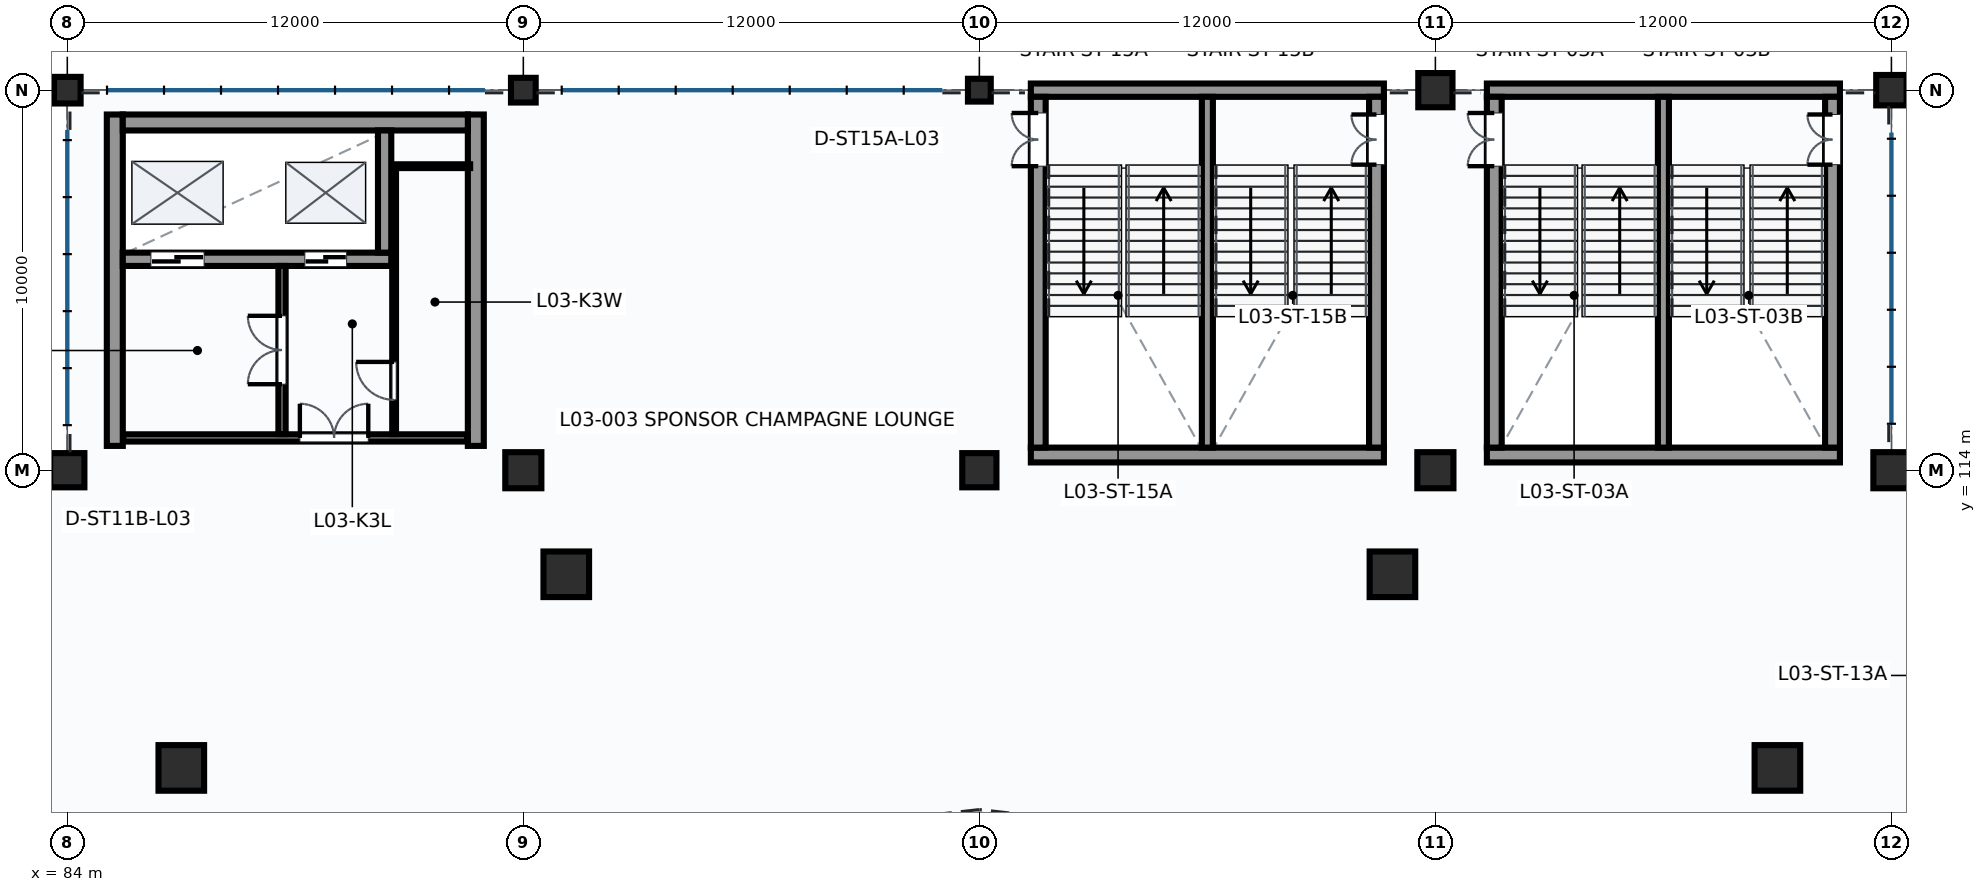
"""IFC4 building model, lengths in metres.
Left out: names, types, materials, properties, quantities, classifications, styles, units other than length and angle.
Written with IfcOpenShell. Run it as: python <this file> out.ifc"""

import sys

from ifc_helpers import new_model, si_unit, direction, frame, frame_2d, origin, origin_2d, place, context, subcontext, project, spatial, rectangle, circle, extrude, element, fill, save


model = new_model("IFC4")
c1 = context("Model", 3, precision=1e-05, world=origin(), true_north=direction((0.0, 1.0)))
c2 = subcontext(c1, "Body", "Model", "MODEL_VIEW")
j1 = project(units=[si_unit("LENGTHUNIT", "METRE"), si_unit("PLANEANGLEUNIT", "RADIAN")], contexts=[c1])
p1 = place(None, origin())
s1 = spatial("IfcSite", under=j1, at=p1, CompositionType="ELEMENT")
p2 = place(p1, origin())
s2 = spatial("IfcBuilding", under=s1, at=p2, CompositionType="ELEMENT")
p3 = place(p2, frame((0.0, 0.0, 14.7)))
s3 = spatial("IfcBuildingStorey", under=s2, at=p3, CompositionType="ELEMENT", Elevation=14.7)
p4 = place(p3, frame((84.0, 114.0, 0.0), z_axis=(0.0, 0.0, 1.0), x_axis=(1.0, 0.0, 0.0)))
e1 = element("IfcColumn", 1, at=p4, inside=s3, PredefinedType="COLUMN", context=c2, shape_type="SweptSolid", body=[
    extrude(circle(Radius=0.45, at=origin_2d()), origin(), (0.0, 0.0, 1.0), 4.5),
])
p5 = place(p3, frame((84.0, 124.0, 0.0), z_axis=(0.0, 0.0, 1.0), x_axis=(1.0, 0.0, 0.0)))
e2 = element("IfcColumn", 2, at=p5, inside=s3, PredefinedType="COLUMN", context=c2, shape_type="SweptSolid", body=[
    extrude(rectangle(XDim=0.7, YDim=0.7, at=origin_2d()), origin(), (0.0, 0.0, 1.0), 4.5),
])
p6 = place(p3, frame((96.0, 114.0, 0.0), z_axis=(0.0, 0.0, 1.0), x_axis=(1.0, 0.0, 0.0)))
e3 = element("IfcColumn", 3, at=p6, inside=s3, PredefinedType="COLUMN", context=c2, shape_type="SweptSolid", body=[
    extrude(rectangle(XDim=0.95, YDim=0.95, at=origin_2d()), origin(), (0.0, 0.0, 1.0), 4.5),
])
p7 = place(p3, frame((96.0, 124.0, 0.0), z_axis=(0.0, 0.0, 1.0), x_axis=(1.0, 0.0, 0.0)))
e4 = element("IfcColumn", 4, at=p7, inside=s3, PredefinedType="COLUMN", context=c2, shape_type="SweptSolid", body=[
    extrude(rectangle(XDim=0.65, YDim=0.65, at=origin_2d()), origin(), (0.0, 0.0, 1.0), 4.5),
])
p8 = place(p3, frame((108.0, 114.0, 0.0), z_axis=(0.0, 0.0, 1.0), x_axis=(1.0, 0.0, 0.0)))
e5 = element("IfcColumn", 5, at=p8, inside=s3, PredefinedType="COLUMN", context=c2, shape_type="SweptSolid", body=[
    extrude(circle(Radius=0.45, at=origin_2d()), origin(), (0.0, 0.0, 1.0), 4.5),
])
p9 = place(p3, frame((108.0, 124.0, 0.0), z_axis=(0.0, 0.0, 1.0), x_axis=(1.0, 0.0, 0.0)))
e6 = element("IfcColumn", 6, at=p9, inside=s3, PredefinedType="COLUMN", context=c2, shape_type="SweptSolid", body=[
    extrude(rectangle(XDim=0.6, YDim=0.6, at=origin_2d()), origin(), (0.0, 0.0, 1.0), 4.5),
])
p10 = place(p3, frame((120.0, 114.0, 0.0), z_axis=(0.0, 0.0, 1.0), x_axis=(1.0, 0.0, 0.0)))
e7 = element("IfcColumn", 7, at=p10, inside=s3, PredefinedType="COLUMN", context=c2, shape_type="SweptSolid", body=[
    extrude(rectangle(XDim=0.95, YDim=0.95, at=origin_2d()), origin(), (0.0, 0.0, 1.0), 4.5),
])
p11 = place(p3, frame((120.0, 124.0, 0.0), z_axis=(0.0, 0.0, 1.0), x_axis=(1.0, 0.0, 0.0)))
e8 = element("IfcColumn", 8, at=p11, inside=s3, PredefinedType="COLUMN", context=c2, shape_type="SweptSolid", body=[
    extrude(circle(Radius=0.45, at=origin_2d()), origin(), (0.0, 0.0, 1.0), 4.5),
])
p12 = place(p3, frame((132.0, 114.0, 0.0), z_axis=(0.0, 0.0, 1.0), x_axis=(1.0, 0.0, 0.0)))
e9 = element("IfcColumn", 9, at=p12, inside=s3, PredefinedType="COLUMN", context=c2, shape_type="SweptSolid", body=[
    extrude(rectangle(XDim=0.95, YDim=0.95, at=origin_2d()), origin(), (0.0, 0.0, 1.0), 4.5),
])
p13 = place(p3, frame((132.0, 124.0, 0.0), z_axis=(0.0, 0.0, 1.0), x_axis=(1.0, 0.0, 0.0)))
e10 = element("IfcColumn", 10, at=p13, inside=s3, PredefinedType="COLUMN", context=c2, shape_type="SweptSolid", body=[
    extrude(circle(Radius=0.4, at=origin_2d()), origin(), (0.0, 0.0, 1.0), 4.5),
])
for number, where, z_axis, x_axis in (
    (11, (129.0, 106.167, 0.0), (0.0, 0.0, 1.0), (1.0, 0.0, 0.0)),
    (12, (118.87, 111.262, 0.0), (0.0, 0.0, 1.0), (1.0, 0.0, 0.0)),
    (13, (97.13, 111.262, 0.0), (0.0, 0.0, 1.0), (1.0, 0.0, 0.0)),
    (14, (87.0, 106.167, 0.0), (0.0, 0.0, 1.0), (1.0, 0.0, 0.0)),
):
    element("IfcColumn", number, at=place(p3, frame(where, z_axis=z_axis, x_axis=x_axis)), inside=s3, PredefinedType="COLUMN", context=c2, shape_type="SweptSolid", body=[
        extrude(rectangle(XDim=1.2, YDim=1.2, at=origin_2d()), origin(), (0.0, 0.0, 1.0), 4.5),
    ])
p14 = place(p3, frame((121.355, 114.4, 0.0), z_axis=(0.0, 0.0, 1.0), x_axis=(1.0, 0.0, 0.0)))
e15 = element("IfcWall", 15, at=p14, inside=s3, PredefinedType="SHEAR", context=c2, shape_type="SweptSolid", body=[
    extrude(rectangle(XDim=9.29, YDim=0.39, at=frame_2d((4.645, 0.0))), origin(), (0.0, 0.0, 1.0), 4.5),
])
p15 = place(p3, frame((121.355, 124.0, 0.0), z_axis=(0.0, 0.0, 1.0), x_axis=(1.0, 0.0, 0.0)))
e16 = element("IfcWall", 16, at=p15, inside=s3, PredefinedType="SHEAR", context=c2, shape_type="SweptSolid", body=[
    extrude(rectangle(XDim=9.29, YDim=0.35, at=frame_2d((4.645, 0.0))), origin(), (0.0, 0.0, 1.0), 3.596),
])
p16 = place(p3, frame((121.55, 114.595, 0.0), z_axis=(0.0, 0.0, 1.0), x_axis=(0.0, 1.0, 0.0)))
e17 = element("IfcWall", 17, at=p16, inside=s3, PredefinedType="SHEAR", context=c2, shape_type="SweptSolid", body=[
    extrude(rectangle(XDim=9.23, YDim=0.39, at=frame_2d((4.615, 0.0))), origin(), (0.0, 0.0, 1.0), 4.5),
])
p17 = place(p16, frame((7.405, 0.0, 0.0)))
e18 = element("IfcOpeningElement", 18, at=p17, cuts=e17, PredefinedType="OPENING", context=c2, shape_type="SweptSolid", body=[
    extrude(rectangle(XDim=1.4, YDim=2.2, at=frame_2d((0.7, 1.1))), frame((0.0, 0.205, 0.0), z_axis=(0.0, -1.0, 0.0), x_axis=(1.0, 0.0, 0.0)), (0.0, 0.0, 1.0), 0.41),
])
p18 = place(p3, frame((130.45, 114.595, 0.0), z_axis=(0.0, 0.0, 1.0), x_axis=(0.0, 1.0, 0.0)))
e19 = element("IfcWall", 19, at=p18, inside=s3, PredefinedType="SHEAR", context=c2, shape_type="SweptSolid", body=[
    extrude(rectangle(XDim=9.23, YDim=0.39, at=frame_2d((4.615, 0.0))), origin(), (0.0, 0.0, 1.0), 4.5),
])
p19 = place(p18, frame((7.445, 0.0, 0.0)))
e20 = element("IfcOpeningElement", 20, at=p19, cuts=e19, PredefinedType="OPENING", context=c2, shape_type="SweptSolid", body=[
    extrude(rectangle(XDim=1.32, YDim=2.2, at=frame_2d((0.66, 1.1))), frame((0.0, 0.205, 0.0), z_axis=(0.0, -1.0, 0.0), x_axis=(1.0, 0.0, 0.0)), (0.0, 0.0, 1.0), 0.41),
])
p20 = place(p3, frame((126.0, 114.595, 0.0), z_axis=(0.0, 0.0, 1.0), x_axis=(0.0, 1.0, 0.0)))
e21 = element("IfcWall", 21, at=p20, inside=s3, PredefinedType="SHEAR", context=c2, shape_type="SweptSolid", body=[
    extrude(rectangle(XDim=9.23, YDim=0.29, at=frame_2d((4.615, 0.0))), origin(), (0.0, 0.0, 1.0), 4.5),
])
p21 = place(p3, frame((109.355, 114.4, 0.0), z_axis=(0.0, 0.0, 1.0), x_axis=(1.0, 0.0, 0.0)))
e22 = element("IfcWall", 22, at=p21, inside=s3, PredefinedType="SHEAR", context=c2, shape_type="SweptSolid", body=[
    extrude(rectangle(XDim=9.29, YDim=0.39, at=frame_2d((4.645, 0.0))), origin(), (0.0, 0.0, 1.0), 4.5),
])
p22 = place(p3, frame((109.355, 124.0, 0.0), z_axis=(0.0, 0.0, 1.0), x_axis=(1.0, 0.0, 0.0)))
e23 = element("IfcWall", 23, at=p22, inside=s3, PredefinedType="SHEAR", context=c2, shape_type="SweptSolid", body=[
    extrude(rectangle(XDim=9.29, YDim=0.35, at=frame_2d((4.645, 0.0))), origin(), (0.0, 0.0, 1.0), 3.447),
])
p23 = place(p3, frame((109.55, 114.595, 0.0), z_axis=(0.0, 0.0, 1.0), x_axis=(0.0, 1.0, 0.0)))
e24 = element("IfcWall", 24, at=p23, inside=s3, PredefinedType="SHEAR", context=c2, shape_type="SweptSolid", body=[
    extrude(rectangle(XDim=9.23, YDim=0.39, at=frame_2d((4.615, 0.0))), origin(), (0.0, 0.0, 1.0), 4.5),
])
p24 = place(p23, frame((7.405, 0.0, 0.0)))
e25 = element("IfcOpeningElement", 25, at=p24, cuts=e24, PredefinedType="OPENING", context=c2, shape_type="SweptSolid", body=[
    extrude(rectangle(XDim=1.4, YDim=2.2, at=frame_2d((0.7, 1.1))), frame((0.0, 0.205, 0.0), z_axis=(0.0, -1.0, 0.0), x_axis=(1.0, 0.0, 0.0)), (0.0, 0.0, 1.0), 0.41),
])
p25 = place(p3, frame((118.45, 114.595, 0.0), z_axis=(0.0, 0.0, 1.0), x_axis=(0.0, 1.0, 0.0)))
e26 = element("IfcWall", 26, at=p25, inside=s3, PredefinedType="SHEAR", context=c2, shape_type="SweptSolid", body=[
    extrude(rectangle(XDim=9.23, YDim=0.39, at=frame_2d((4.615, 0.0))), origin(), (0.0, 0.0, 1.0), 4.5),
])
p26 = place(p25, frame((7.445, 0.0, 0.0)))
e27 = element("IfcOpeningElement", 27, at=p26, cuts=e26, PredefinedType="OPENING", context=c2, shape_type="SweptSolid", body=[
    extrude(rectangle(XDim=1.32, YDim=2.2, at=frame_2d((0.66, 1.1))), frame((0.0, 0.205, 0.0), z_axis=(0.0, -1.0, 0.0), x_axis=(1.0, 0.0, 0.0)), (0.0, 0.0, 1.0), 0.41),
])
p27 = place(p3, frame((114.0, 114.595, 0.0), z_axis=(0.0, 0.0, 1.0), x_axis=(0.0, 1.0, 0.0)))
e28 = element("IfcWall", 28, at=p27, inside=s3, PredefinedType="SHEAR", context=c2, shape_type="SweptSolid", body=[
    extrude(rectangle(XDim=9.23, YDim=0.29, at=frame_2d((4.615, 0.0))), origin(), (0.0, 0.0, 1.0), 4.5),
])
for number, where, z_axis, x_axis in (
    (29, (85.25, 114.64, 0.0), (0.0, 0.0, 1.0), (0.0, 1.0, 0.0)),
    (30, (94.75, 114.64, 0.0), (0.0, 0.0, 1.0), (0.0, 1.0, 0.0)),
):
    element("IfcWall", number, at=place(p3, frame(where, z_axis=z_axis, x_axis=x_axis)), inside=s3, PredefinedType="SHEAR", context=c2, shape_type="SweptSolid", body=[
        extrude(rectangle(XDim=8.72, YDim=0.42, at=frame_2d((4.36, 0.0))), origin(), (0.0, 0.0, 1.0), 4.5),
    ])
p28 = place(p3, frame((85.46, 123.15, 0.0), z_axis=(0.0, 0.0, 1.0), x_axis=(1.0, 0.0, 0.0)))
e31 = element("IfcWall", 31, at=p28, inside=s3, PredefinedType="SHEAR", context=c2, shape_type="SweptSolid", body=[
    extrude(rectangle(XDim=9.08, YDim=0.42, at=frame_2d((4.54, 0.0))), origin(), (0.0, 0.0, 1.0), 4.5),
])
p29 = place(p3, frame((85.46, 119.55, 0.0), z_axis=(0.0, 0.0, 1.0), x_axis=(1.0, 0.0, 0.0)))
e32 = element("IfcWall", 32, at=p29, inside=s3, PredefinedType="SHEAR", context=c2, shape_type="SweptSolid", body=[
    extrude(rectangle(XDim=7.065, YDim=0.35, at=frame_2d((3.532, 0.0))), origin(), (0.0, 0.0, 1.0), 4.5),
])
p30 = place(p29, frame((0.74, 0.0, 0.0)))
e33 = element("IfcOpeningElement", 33, at=p30, cuts=e32, PredefinedType="OPENING", context=c2, shape_type="SweptSolid", body=[
    extrude(rectangle(XDim=1.4, YDim=2.3, at=frame_2d((0.7, 1.15))), frame((0.0, 0.185, 0.0), z_axis=(0.0, -1.0, 0.0), x_axis=(1.0, 0.0, 0.0)), (0.0, 0.0, 1.0), 0.37),
])
p31 = place(p29, frame((4.79, 0.0, 0.0)))
e34 = element("IfcOpeningElement", 34, at=p31, cuts=e32, PredefinedType="OPENING", context=c2, shape_type="SweptSolid", body=[
    extrude(rectangle(XDim=1.1, YDim=2.2, at=frame_2d((0.55, 1.1))), frame((0.0, 0.185, 0.0), z_axis=(0.0, -1.0, 0.0), x_axis=(1.0, 0.0, 0.0)), (0.0, 0.0, 1.0), 0.37),
])
p32 = place(p3, frame((92.35, 119.725, 0.0), z_axis=(0.0, 0.0, 1.0), x_axis=(0.0, 1.0, 0.0)))
e35 = element("IfcWall", 35, at=p32, inside=s3, PredefinedType="SHEAR", context=c2, shape_type="SweptSolid", body=[
    extrude(rectangle(XDim=3.215, YDim=0.35, at=frame_2d((1.607, 0.0))), origin(), (0.0, 0.0, 1.0), 4.5),
])
p33 = place(p3, frame((85.47, 114.85, 0.0), z_axis=(0.0, 0.0, 1.0), x_axis=(1.0, 0.0, 0.0)))
e36 = element("IfcWall", 36, at=p33, inside=s3, PredefinedType="PARTITIONING", context=c2, shape_type="SweptSolid", body=[
    extrude(rectangle(XDim=9.06, YDim=0.19, at=frame_2d((4.53, 0.0))), origin(), (0.0, 0.0, 1.0), 4.16),
])
p34 = place(p33, frame((4.65, 0.0, 0.0)))
e37 = element("IfcOpeningElement", 37, at=p34, cuts=e36, PredefinedType="OPENING", context=c2, shape_type="SweptSolid", body=[
    extrude(rectangle(XDim=1.8, YDim=2.3, at=frame_2d((0.9, 1.15))), frame((0.0, 0.105, 0.0), z_axis=(0.0, -1.0, 0.0), x_axis=(1.0, 0.0, 0.0)), (0.0, 0.0, 1.0), 0.21),
])
p35 = place(p3, frame((89.65, 114.95, 0.0), z_axis=(0.0, 0.0, 1.0), x_axis=(0.0, 1.0, 0.0)))
e38 = element("IfcWall", 38, at=p35, inside=s3, PredefinedType="PARTITIONING", context=c2, shape_type="SweptSolid", body=[
    extrude(rectangle(XDim=4.425, YDim=0.19, at=frame_2d((2.212, 0.0))), origin(), (0.0, 0.0, 1.0), 4.16),
])
p36 = place(p35, frame((1.313, 0.0, 0.0)))
e39 = element("IfcOpeningElement", 39, at=p36, cuts=e38, PredefinedType="OPENING", context=c2, shape_type="SweptSolid", body=[
    extrude(rectangle(XDim=1.8, YDim=2.2, at=frame_2d((0.9, 1.1))), frame((0.0, 0.105, 0.0), z_axis=(0.0, -1.0, 0.0), x_axis=(1.0, 0.0, 0.0)), (0.0, 0.0, 1.0), 0.21),
])
p37 = place(p3, frame((92.6, 114.95, 0.0), z_axis=(0.0, 0.0, 1.0), x_axis=(0.0, 1.0, 0.0)))
e40 = element("IfcWall", 40, at=p37, inside=s3, PredefinedType="PARTITIONING", context=c2, shape_type="SweptSolid", body=[
    extrude(rectangle(XDim=7.05, YDim=0.1, at=frame_2d((3.525, 0.0))), origin(), (0.0, 0.0, 1.0), 4.16),
])
p38 = place(p37, frame((0.9, 0.0, 0.0)))
e41 = element("IfcOpeningElement", 41, at=p38, cuts=e40, PredefinedType="OPENING", context=c2, shape_type="SweptSolid", body=[
    extrude(rectangle(XDim=1.0, YDim=2.1, at=frame_2d((0.5, 1.05))), frame((0.0, 0.06, 0.0), z_axis=(0.0, -1.0, 0.0), x_axis=(1.0, 0.0, 0.0)), (0.0, 0.0, 1.0), 0.12),
])
p39 = place(p3, frame((92.6, 122.0, 0.0), z_axis=(0.0, 0.0, 1.0), x_axis=(1.0, 0.0, 0.0)))
e42 = element("IfcWall", 42, at=p39, inside=s3, PredefinedType="PARTITIONING", context=c2, shape_type="SweptSolid", body=[
    extrude(rectangle(XDim=2.0, YDim=0.1, at=frame_2d((1.0, 0.0))), origin(), (0.0, 0.0, 1.0), 4.16),
])
p40 = place(p17, frame((1.4, 0.0, 0.0), z_axis=(0.0, 0.0, 1.0), x_axis=(-1.0, 0.0, 0.0)))
e43 = element("IfcDoor", 43, at=p40, inside=s3, OperationType="DOUBLE_DOOR_SINGLE_SWING", PredefinedType="DOOR", context=c2, shape_type="SweptSolid", body=[
    extrude(rectangle(XDim=1.4, YDim=2.2, at=frame_2d((0.7, 1.1))), frame((0.0, 0.025, 0.0), z_axis=(0.0, -1.0, 0.0), x_axis=(1.0, 0.0, 0.0)), (0.0, 0.0, 1.0), 0.05),
])
fill(e18, e43)
p41 = place(p19, origin())
e44 = element("IfcDoor", 44, at=p41, inside=s3, OperationType="DOUBLE_DOOR_SINGLE_SWING", PredefinedType="DOOR", context=c2, shape_type="SweptSolid", body=[
    extrude(rectangle(XDim=1.32, YDim=2.2, at=frame_2d((0.66, 1.1))), frame((0.0, 0.025, 0.0), z_axis=(0.0, -1.0, 0.0), x_axis=(1.0, 0.0, 0.0)), (0.0, 0.0, 1.0), 0.05),
])
fill(e20, e44)
p42 = place(p24, frame((1.4, 0.0, 0.0), z_axis=(0.0, 0.0, 1.0), x_axis=(-1.0, 0.0, 0.0)))
e45 = element("IfcDoor", 45, at=p42, inside=s3, OperationType="DOUBLE_DOOR_SINGLE_SWING", PredefinedType="DOOR", context=c2, shape_type="SweptSolid", body=[
    extrude(rectangle(XDim=1.4, YDim=2.2, at=frame_2d((0.7, 1.1))), frame((0.0, 0.025, 0.0), z_axis=(0.0, -1.0, 0.0), x_axis=(1.0, 0.0, 0.0)), (0.0, 0.0, 1.0), 0.05),
])
fill(e25, e45)
p43 = place(p26, origin())
e46 = element("IfcDoor", 46, at=p43, inside=s3, OperationType="DOUBLE_DOOR_SINGLE_SWING", PredefinedType="DOOR", context=c2, shape_type="SweptSolid", body=[
    extrude(rectangle(XDim=1.32, YDim=2.2, at=frame_2d((0.66, 1.1))), frame((0.0, 0.025, 0.0), z_axis=(0.0, -1.0, 0.0), x_axis=(1.0, 0.0, 0.0)), (0.0, 0.0, 1.0), 0.05),
])
fill(e27, e46)
p44 = place(p30, origin())
e47 = element("IfcDoor", 47, at=p44, inside=s3, OperationType="SLIDING_TO_LEFT", PredefinedType="DOOR", context=c2, shape_type="SweptSolid", body=[
    extrude(rectangle(XDim=1.4, YDim=2.3, at=frame_2d((0.7, 1.15))), frame((0.0, 0.025, 0.0), z_axis=(0.0, -1.0, 0.0), x_axis=(1.0, 0.0, 0.0)), (0.0, 0.0, 1.0), 0.05),
])
fill(e33, e47)
p45 = place(p31, origin())
e48 = element("IfcDoor", 48, at=p45, inside=s3, OperationType="SLIDING_TO_LEFT", PredefinedType="DOOR", context=c2, shape_type="SweptSolid", body=[
    extrude(rectangle(XDim=1.1, YDim=2.2, at=frame_2d((0.55, 1.1))), frame((0.0, 0.025, 0.0), z_axis=(0.0, -1.0, 0.0), x_axis=(1.0, 0.0, 0.0)), (0.0, 0.0, 1.0), 0.05),
])
fill(e34, e48)
p46 = place(p34, origin())
e49 = element("IfcDoor", 49, at=p46, inside=s3, OperationType="DOUBLE_DOOR_SINGLE_SWING", PredefinedType="DOOR", context=c2, shape_type="SweptSolid", body=[
    extrude(rectangle(XDim=1.8, YDim=2.3, at=frame_2d((0.9, 1.15))), frame((0.0, 0.025, 0.0), z_axis=(0.0, -1.0, 0.0), x_axis=(1.0, 0.0, 0.0)), (0.0, 0.0, 1.0), 0.05),
])
fill(e37, e49)
p47 = place(p36, origin())
e50 = element("IfcDoor", 50, at=p47, inside=s3, OperationType="DOUBLE_DOOR_SINGLE_SWING", PredefinedType="DOOR", context=c2, shape_type="SweptSolid", body=[
    extrude(rectangle(XDim=1.8, YDim=2.2, at=frame_2d((0.9, 1.1))), frame((0.0, 0.025, 0.0), z_axis=(0.0, -1.0, 0.0), x_axis=(1.0, 0.0, 0.0)), (0.0, 0.0, 1.0), 0.05),
])
fill(e39, e50)
p48 = place(p38, origin())
e51 = element("IfcDoor", 51, at=p48, inside=s3, OperationType="SINGLE_SWING_RIGHT", PredefinedType="DOOR", context=c2, shape_type="SweptSolid", body=[
    extrude(rectangle(XDim=1.0, YDim=2.1, at=frame_2d((0.5, 1.05))), frame((0.0, 0.025, 0.0), z_axis=(0.0, -1.0, 0.0), x_axis=(1.0, 0.0, 0.0)), (0.0, 0.0, 1.0), 0.05),
])
fill(e41, e51)
save(model, sys.argv[1])
